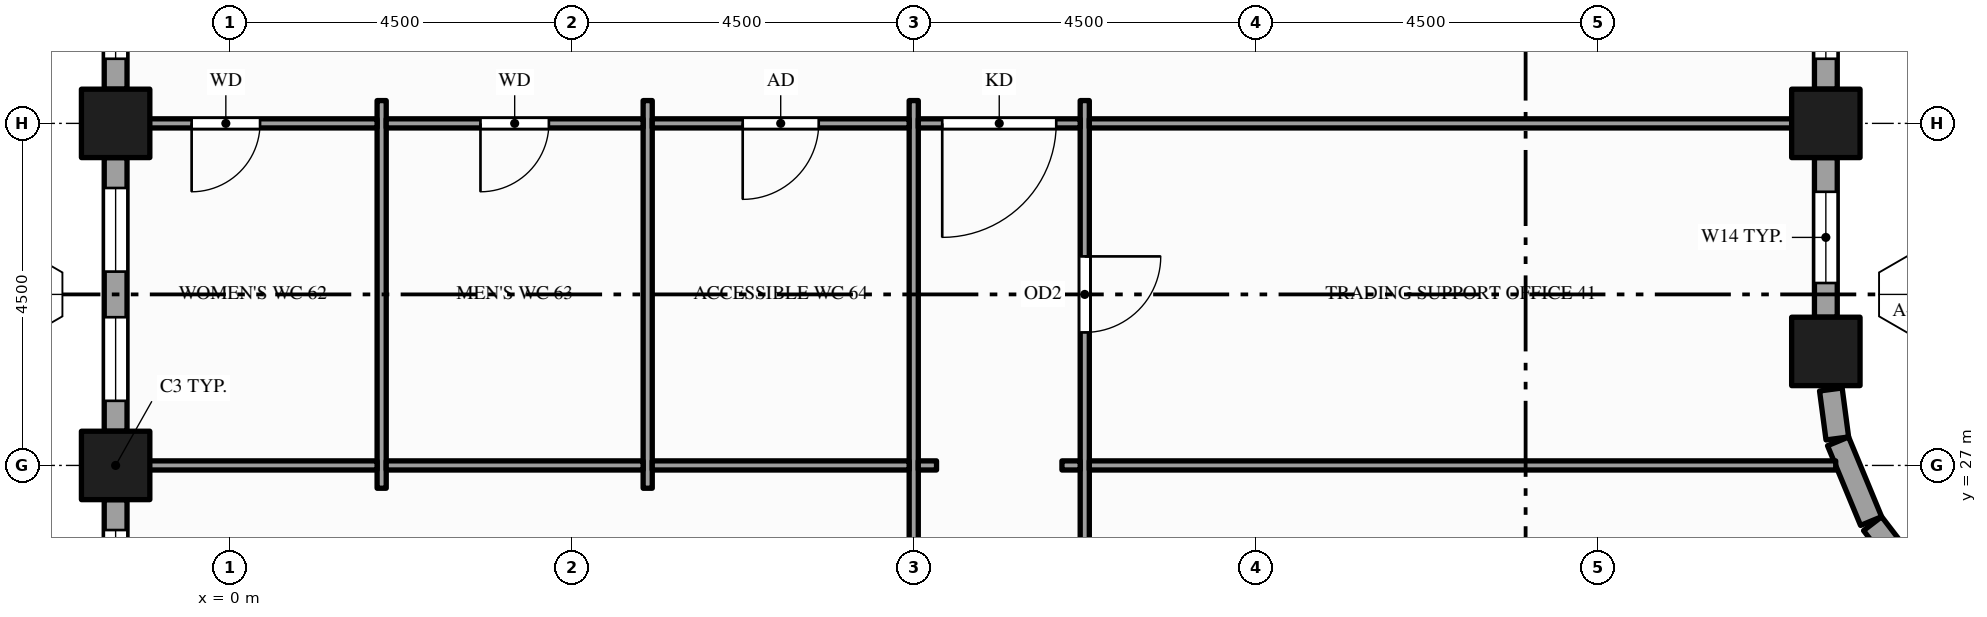
"""IFC4 building model, lengths in metres.
Left out: names, types, materials, properties, quantities, classifications, styles, units other than length and angle.
Written with IfcOpenShell. Run it as: python <this file> out.ifc"""

import sys

from ifc_helpers import new_model, si_unit, direction, frame, frame_2d, origin, origin_2d, place, context, subcontext, project, spatial, rectangle, hollow_rectangle, extrude, element, fill, save


model = new_model("IFC4")
c1 = context("Model", 3, precision=1e-05, world=origin(), true_north=direction((0.0, 1.0)))
c2 = subcontext(c1, "Body", "Model", "MODEL_VIEW")
j1 = project(units=[si_unit("LENGTHUNIT", "METRE"), si_unit("PLANEANGLEUNIT", "RADIAN")], contexts=[c1])
p1 = place(None, origin())
s1 = spatial("IfcSite", under=j1, at=p1, CompositionType="ELEMENT")
p2 = place(p1, origin())
s2 = spatial("IfcBuilding", under=s1, at=p2, CompositionType="ELEMENT")
p3 = place(p2, frame((0.0, 0.0, 139.0)))
s3 = spatial("IfcBuildingStorey", under=s2, at=p3, CompositionType="ELEMENT", Elevation=139.0)
for number, where, z_axis, x_axis in (
    (1, (-1.5, 27.0, -0.15), (0.0, 0.0, 1.0), (1.0, 0.0, 0.0)),
    (2, (-1.5, 31.5, -0.15), (0.0, 0.0, 1.0), (1.0, 0.0, 0.0)),
    (3, (21.0, 28.5, -0.15), (0.0, 0.0, 1.0), (1.0, 0.0, 0.0)),
    (4, (21.0, 31.5, -0.15), (0.0, 0.0, 1.0), (1.0, 0.0, 0.0)),
):
    element("IfcColumn", number, at=place(p3, frame(where, z_axis=z_axis, x_axis=x_axis)), inside=s3, PredefinedType="COLUMN", context=c2, shape_type="SweptSolid", body=[
        extrude(hollow_rectangle(XDim=0.9, YDim=0.9, WallThickness=0.045, at=origin_2d()), origin(), (0.0, 0.0, 1.0), 4.0),
    ])
p4 = place(p3, frame((21.934, 25.819, 0.0), z_axis=(0.0, 0.0, 1.0), x_axis=(-0.608539141726, 0.793523857856, 0.0)))
e5 = element("IfcWall", 5, at=p4, inside=s3, PredefinedType="STANDARD", context=c2, shape_type="SweptSolid", body=[
    extrude(rectangle(XDim=0.524, YDim=0.3, at=frame_2d((0.262, 0.0))), origin(), (0.0, 0.0, 1.0), 3.149),
])
p5 = place(p3, frame((21.595, 26.268, 0.0), z_axis=(0.0, 0.0, 1.0), x_axis=(-0.382598720491, 0.923914616768, 0.0)))
e6 = element("IfcWall", 6, at=p5, inside=s3, PredefinedType="STANDARD", context=c2, shape_type="SweptSolid", body=[
    extrude(rectangle(XDim=1.135, YDim=0.3, at=frame_2d((0.568, 0.0))), origin(), (0.0, 0.0, 1.0), 3.149),
])
p6 = place(p3, frame((21.151, 27.355, 0.0), z_axis=(0.0, 0.0, 1.0), x_axis=(-0.130687655177, 0.991423590996, 0.0)))
e7 = element("IfcWall", 7, at=p6, inside=s3, PredefinedType="STANDARD", context=c2, shape_type="SweptSolid", body=[
    extrude(rectangle(XDim=0.65, YDim=0.3, at=frame_2d((0.325, 0.0))), origin(), (0.0, 0.0, 1.0), 3.149),
])
p7 = place(p3, frame((21.0, 28.95, 0.0), z_axis=(0.0, 0.0, 1.0), x_axis=(0.0, 1.0, 0.0)))
e8 = element("IfcWall", 8, at=p7, inside=s3, PredefinedType="STANDARD", context=c2, shape_type="SweptSolid", body=[
    extrude(rectangle(XDim=2.1, YDim=0.3, at=frame_2d((1.05, 0.0))), origin(), (0.0, 0.0, 1.0), 3.149),
])
p8 = place(p7, frame((0.45, 0.0, 0.9)))
e9 = element("IfcOpeningElement", 9, at=p8, cuts=e8, PredefinedType="OPENING", context=c2, shape_type="SweptSolid", body=[
    extrude(rectangle(XDim=1.2, YDim=2.0, at=frame_2d((0.6, 1.0))), frame((0.0, 0.16, 0.0), z_axis=(0.0, -1.0, 0.0), x_axis=(1.0, 0.0, 0.0)), (0.0, 0.0, 1.0), 0.32),
])
p9 = place(p3, frame((21.0, 31.95, 0.0), z_axis=(0.0, 0.0, 1.0), x_axis=(0.0, 1.0, 0.0)))
e10 = element("IfcWall", 10, at=p9, inside=s3, PredefinedType="STANDARD", context=c2, shape_type="SweptSolid", body=[
    extrude(rectangle(XDim=4.05, YDim=0.3, at=frame_2d((2.025, 0.0))), origin(), (0.0, 0.0, 1.0), 3.149),
])
p10 = place(p9, frame((0.4, 0.0, 0.9)))
e11 = element("IfcOpeningElement", 11, at=p10, cuts=e10, PredefinedType="OPENING", context=c2, shape_type="SweptSolid", body=[
    extrude(rectangle(XDim=1.1, YDim=2.0, at=frame_2d((0.55, 1.0))), frame((0.0, 0.16, 0.0), z_axis=(0.0, -1.0, 0.0), x_axis=(1.0, 0.0, 0.0)), (0.0, 0.0, 1.0), 0.32),
])
p11 = place(p9, frame((2.1, 0.0, 0.9)))
e12 = element("IfcOpeningElement", 12, at=p11, cuts=e10, PredefinedType="OPENING", context=c2, shape_type="SweptSolid", body=[
    extrude(rectangle(XDim=1.55, YDim=2.0, at=frame_2d((0.775, 1.0))), frame((0.0, 0.16, 0.0), z_axis=(0.0, -1.0, 0.0), x_axis=(1.0, 0.0, 0.0)), (0.0, 0.0, 1.0), 0.32),
])
p12 = place(p3, frame((-1.5, 35.55, 0.0), z_axis=(0.0, 0.0, 1.0), x_axis=(0.0, -1.0, 0.0)))
e13 = element("IfcWall", 13, at=p12, inside=s3, PredefinedType="STANDARD", context=c2, shape_type="SweptSolid", body=[
    extrude(rectangle(XDim=3.6, YDim=0.3, at=frame_2d((1.8, 0.0))), origin(), (0.0, 0.0, 1.0), 3.149),
])
p13 = place(p12, frame((0.4, 0.0, 0.9)))
e14 = element("IfcOpeningElement", 14, at=p13, cuts=e13, PredefinedType="OPENING", context=c2, shape_type="SweptSolid", body=[
    extrude(rectangle(XDim=1.1, YDim=2.0, at=frame_2d((0.55, 1.0))), frame((0.0, 0.16, 0.0), z_axis=(0.0, -1.0, 0.0), x_axis=(1.0, 0.0, 0.0)), (0.0, 0.0, 1.0), 0.32),
])
p14 = place(p12, frame((2.1, 0.0, 0.9)))
e15 = element("IfcOpeningElement", 15, at=p14, cuts=e13, PredefinedType="OPENING", context=c2, shape_type="SweptSolid", body=[
    extrude(rectangle(XDim=1.1, YDim=2.0, at=frame_2d((0.55, 1.0))), frame((0.0, 0.16, 0.0), z_axis=(0.0, -1.0, 0.0), x_axis=(1.0, 0.0, 0.0)), (0.0, 0.0, 1.0), 0.32),
])
p15 = place(p3, frame((-1.5, 31.05, 0.0), z_axis=(0.0, 0.0, 1.0), x_axis=(0.0, -1.0, 0.0)))
e16 = element("IfcWall", 16, at=p15, inside=s3, PredefinedType="STANDARD", context=c2, shape_type="SweptSolid", body=[
    extrude(rectangle(XDim=3.6, YDim=0.3, at=frame_2d((1.8, 0.0))), origin(), (0.0, 0.0, 1.0), 3.149),
])
p16 = place(p15, frame((0.4, 0.0, 0.9)))
e17 = element("IfcOpeningElement", 17, at=p16, cuts=e16, PredefinedType="OPENING", context=c2, shape_type="SweptSolid", body=[
    extrude(rectangle(XDim=1.1, YDim=2.0, at=frame_2d((0.55, 1.0))), frame((0.0, 0.16, 0.0), z_axis=(0.0, -1.0, 0.0), x_axis=(1.0, 0.0, 0.0)), (0.0, 0.0, 1.0), 0.32),
])
p17 = place(p15, frame((2.1, 0.0, 0.9)))
e18 = element("IfcOpeningElement", 18, at=p17, cuts=e16, PredefinedType="OPENING", context=c2, shape_type="SweptSolid", body=[
    extrude(rectangle(XDim=1.1, YDim=2.0, at=frame_2d((0.55, 1.0))), frame((0.0, 0.16, 0.0), z_axis=(0.0, -1.0, 0.0), x_axis=(1.0, 0.0, 0.0)), (0.0, 0.0, 1.0), 0.32),
])
p18 = place(p3, frame((-1.5, 26.55, 0.0), z_axis=(0.0, 0.0, 1.0), x_axis=(0.0, -1.0, 0.0)))
e19 = element("IfcWall", 19, at=p18, inside=s3, PredefinedType="STANDARD", context=c2, shape_type="SweptSolid", body=[
    extrude(rectangle(XDim=3.6, YDim=0.3, at=frame_2d((1.8, 0.0))), origin(), (0.0, 0.0, 1.0), 3.149),
])
p19 = place(p18, frame((0.4, 0.0, 0.9)))
e20 = element("IfcOpeningElement", 20, at=p19, cuts=e19, PredefinedType="OPENING", context=c2, shape_type="SweptSolid", body=[
    extrude(rectangle(XDim=1.1, YDim=2.0, at=frame_2d((0.55, 1.0))), frame((0.0, 0.16, 0.0), z_axis=(0.0, -1.0, 0.0), x_axis=(1.0, 0.0, 0.0)), (0.0, 0.0, 1.0), 0.32),
])
p20 = place(p18, frame((2.1, 0.0, 0.9)))
e21 = element("IfcOpeningElement", 21, at=p20, cuts=e19, PredefinedType="OPENING", context=c2, shape_type="SweptSolid", body=[
    extrude(rectangle(XDim=1.1, YDim=2.0, at=frame_2d((0.55, 1.0))), frame((0.0, 0.16, 0.0), z_axis=(0.0, -1.0, 0.0), x_axis=(1.0, 0.0, 0.0)), (0.0, 0.0, 1.0), 0.32),
])
for number, where, z_axis, x_axis in (
    (22, (2.0, 26.7, 0.0), (0.0, 0.0, 1.0), (0.0, 1.0, 0.0)),
    (23, (5.5, 26.7, 0.0), (0.0, 0.0, 1.0), (0.0, 1.0, 0.0)),
):
    element("IfcWall", number, at=place(p3, frame(where, z_axis=z_axis, x_axis=x_axis)), inside=s3, PredefinedType="PARTITIONING", context=c2, shape_type="SweptSolid", body=[
        extrude(rectangle(XDim=5.1, YDim=0.12, at=frame_2d((2.55, 0.0))), origin(), (0.0, 0.0, 1.0), 3.85),
    ])
p21 = place(p3, frame((9.0, 10.95, 0.0), z_axis=(0.0, 0.0, 1.0), x_axis=(0.0, 1.0, 0.0)))
e24 = element("IfcWall", 24, at=p21, inside=s3, PredefinedType="PARTITIONING", context=c2, shape_type="SweptSolid", body=[
    extrude(rectangle(XDim=20.85, YDim=0.12, at=frame_2d((10.425, 0.0))), origin(), (0.0, 0.0, 1.0), 2.6),
])
p22 = place(p21, frame((2.05, 0.0, 0.0)))
e25 = element("IfcOpeningElement", 25, at=p22, cuts=e24, PredefinedType="OPENING", context=c2, shape_type="SweptSolid", body=[
    extrude(rectangle(XDim=1.0, YDim=2.1, at=frame_2d((0.5, 1.05))), frame((0.0, 0.07, 0.0), z_axis=(0.0, -1.0, 0.0), x_axis=(1.0, 0.0, 0.0)), (0.0, 0.0, 1.0), 0.14),
])
p23 = place(p21, frame((6.55, 0.0, 0.0)))
e26 = element("IfcOpeningElement", 26, at=p23, cuts=e24, PredefinedType="OPENING", context=c2, shape_type="SweptSolid", body=[
    extrude(rectangle(XDim=1.0, YDim=2.1, at=frame_2d((0.5, 1.05))), frame((0.0, 0.07, 0.0), z_axis=(0.0, -1.0, 0.0), x_axis=(1.0, 0.0, 0.0)), (0.0, 0.0, 1.0), 0.14),
])
p24 = place(p21, frame((11.805, 0.0, 0.0)))
e27 = element("IfcOpeningElement", 27, at=p24, cuts=e24, PredefinedType="OPENING", context=c2, shape_type="SweptSolid", body=[
    extrude(rectangle(XDim=1.8, YDim=2.1, at=frame_2d((0.9, 1.05))), frame((0.0, 0.07, 0.0), z_axis=(0.0, -1.0, 0.0), x_axis=(1.0, 0.0, 0.0)), (0.0, 0.0, 1.0), 0.14),
])
p25 = place(p3, frame((11.25, 10.95, 0.0), z_axis=(0.0, 0.0, 1.0), x_axis=(0.0, 1.0, 0.0)))
e28 = element("IfcWall", 28, at=p25, inside=s3, PredefinedType="PARTITIONING", context=c2, shape_type="SweptSolid", body=[
    extrude(rectangle(XDim=20.85, YDim=0.12, at=frame_2d((10.425, 0.0))), origin(), (0.0, 0.0, 1.0), 2.6),
])
p26 = place(p25, frame((17.8, 0.0, 0.0)))
e29 = element("IfcOpeningElement", 29, at=p26, cuts=e28, PredefinedType="OPENING", context=c2, shape_type="SweptSolid", body=[
    extrude(rectangle(XDim=1.0, YDim=2.1, at=frame_2d((0.5, 1.05))), frame((0.0, 0.07, 0.0), z_axis=(0.0, -1.0, 0.0), x_axis=(1.0, 0.0, 0.0)), (0.0, 0.0, 1.0), 0.14),
])
p27 = place(p25, frame((4.2, 0.0, 0.0)))
e30 = element("IfcOpeningElement", 30, at=p27, cuts=e28, PredefinedType="OPENING", context=c2, shape_type="SweptSolid", body=[
    extrude(rectangle(XDim=1.2, YDim=2.1, at=frame_2d((0.6, 1.05))), frame((0.0, 0.07, 0.0), z_axis=(0.0, -1.0, 0.0), x_axis=(1.0, 0.0, 0.0)), (0.0, 0.0, 1.0), 0.14),
])
p28 = place(p3, frame((-1.35, 27.0, 0.0), z_axis=(0.0, 0.0, 1.0), x_axis=(1.0, 0.0, 0.0)))
e31 = element("IfcWall", 31, at=p28, inside=s3, PredefinedType="PARTITIONING", context=c2, shape_type="SweptSolid", body=[
    extrude(rectangle(XDim=3.29, YDim=0.12, at=frame_2d((1.645, 0.0))), origin(), (0.0, 0.0, 1.0), 2.87),
])
for number, where, z_axis, x_axis in (
    (32, (2.06, 27.0, 0.0), (0.0, 0.0, 1.0), (1.0, 0.0, 0.0)),
    (33, (5.56, 27.0, 0.0), (0.0, 0.0, 1.0), (1.0, 0.0, 0.0)),
):
    element("IfcWall", number, at=place(p3, frame(where, z_axis=z_axis, x_axis=x_axis)), inside=s3, PredefinedType="PARTITIONING", context=c2, shape_type="SweptSolid", body=[
        extrude(rectangle(XDim=3.38, YDim=0.12, at=frame_2d((1.69, 0.0))), origin(), (0.0, 0.0, 1.0), 2.87),
    ])
for number, where, z_axis, x_axis in (
    (34, (9.06, 27.0, 0.0), (0.0, 0.0, 1.0), (1.0, 0.0, 0.0)),
    (35, (10.95, 27.0, 0.0), (0.0, 0.0, 1.0), (1.0, 0.0, 0.0)),
):
    element("IfcWall", number, at=place(p3, frame(where, z_axis=z_axis, x_axis=x_axis)), inside=s3, PredefinedType="PARTITIONING", context=c2, shape_type="SweptSolid", body=[
        extrude(rectangle(XDim=0.24, YDim=0.12, at=frame_2d((0.12, 0.0))), origin(), (0.0, 0.0, 1.0), 2.87),
    ])
p29 = place(p3, frame((11.31, 27.0, 0.0), z_axis=(0.0, 0.0, 1.0), x_axis=(1.0, 0.0, 0.0)))
e36 = element("IfcWall", 36, at=p29, inside=s3, PredefinedType="PARTITIONING", context=c2, shape_type="SweptSolid", body=[
    extrude(rectangle(XDim=9.82, YDim=0.12, at=frame_2d((4.91, 0.0))), origin(), (0.0, 0.0, 1.0), 2.87),
])
p30 = place(p3, frame((-1.35, 31.5, 0.0), z_axis=(0.0, 0.0, 1.0), x_axis=(1.0, 0.0, 0.0)))
e37 = element("IfcWall", 37, at=p30, inside=s3, PredefinedType="PARTITIONING", context=c2, shape_type="SweptSolid", body=[
    extrude(rectangle(XDim=3.29, YDim=0.12, at=frame_2d((1.645, 0.0))), origin(), (0.0, 0.0, 1.0), 2.87),
])
p31 = place(p30, frame((0.85, 0.0, 0.0)))
e38 = element("IfcOpeningElement", 38, at=p31, cuts=e37, PredefinedType="OPENING", context=c2, shape_type="SweptSolid", body=[
    extrude(rectangle(XDim=0.9, YDim=2.1, at=frame_2d((0.45, 1.05))), frame((0.0, 0.07, 0.0), z_axis=(0.0, -1.0, 0.0), x_axis=(1.0, 0.0, 0.0)), (0.0, 0.0, 1.0), 0.14),
])
p32 = place(p3, frame((2.06, 31.5, 0.0), z_axis=(0.0, 0.0, 1.0), x_axis=(1.0, 0.0, 0.0)))
e39 = element("IfcWall", 39, at=p32, inside=s3, PredefinedType="PARTITIONING", context=c2, shape_type="SweptSolid", body=[
    extrude(rectangle(XDim=3.38, YDim=0.12, at=frame_2d((1.69, 0.0))), origin(), (0.0, 0.0, 1.0), 2.87),
])
p33 = place(p32, frame((1.24, 0.0, 0.0)))
e40 = element("IfcOpeningElement", 40, at=p33, cuts=e39, PredefinedType="OPENING", context=c2, shape_type="SweptSolid", body=[
    extrude(rectangle(XDim=0.9, YDim=2.1, at=frame_2d((0.45, 1.05))), frame((0.0, 0.07, 0.0), z_axis=(0.0, -1.0, 0.0), x_axis=(1.0, 0.0, 0.0)), (0.0, 0.0, 1.0), 0.14),
])
p34 = place(p3, frame((5.56, 31.5, 0.0), z_axis=(0.0, 0.0, 1.0), x_axis=(1.0, 0.0, 0.0)))
e41 = element("IfcWall", 41, at=p34, inside=s3, PredefinedType="PARTITIONING", context=c2, shape_type="SweptSolid", body=[
    extrude(rectangle(XDim=3.38, YDim=0.12, at=frame_2d((1.69, 0.0))), origin(), (0.0, 0.0, 1.0), 2.87),
])
p35 = place(p34, frame((1.19, 0.0, 0.0)))
e42 = element("IfcOpeningElement", 42, at=p35, cuts=e41, PredefinedType="OPENING", context=c2, shape_type="SweptSolid", body=[
    extrude(rectangle(XDim=1.0, YDim=2.1, at=frame_2d((0.5, 1.05))), frame((0.0, 0.07, 0.0), z_axis=(0.0, -1.0, 0.0), x_axis=(1.0, 0.0, 0.0)), (0.0, 0.0, 1.0), 0.14),
])
p36 = place(p3, frame((9.06, 31.5, 0.0), z_axis=(0.0, 0.0, 1.0), x_axis=(1.0, 0.0, 0.0)))
e43 = element("IfcWall", 43, at=p36, inside=s3, PredefinedType="PARTITIONING", context=c2, shape_type="SweptSolid", body=[
    extrude(rectangle(XDim=2.13, YDim=0.12, at=frame_2d((1.065, 0.0))), origin(), (0.0, 0.0, 1.0), 2.87),
])
p37 = place(p36, frame((0.315, 0.0, 0.0)))
e44 = element("IfcOpeningElement", 44, at=p37, cuts=e43, PredefinedType="OPENING", context=c2, shape_type="SweptSolid", body=[
    extrude(rectangle(XDim=1.5, YDim=2.1, at=frame_2d((0.75, 1.05))), frame((0.0, 0.07, 0.0), z_axis=(0.0, -1.0, 0.0), x_axis=(1.0, 0.0, 0.0)), (0.0, 0.0, 1.0), 0.14),
])
p38 = place(p3, frame((11.31, 31.5, 0.0), z_axis=(0.0, 0.0, 1.0), x_axis=(1.0, 0.0, 0.0)))
e45 = element("IfcWall", 45, at=p38, inside=s3, PredefinedType="PARTITIONING", context=c2, shape_type="SweptSolid", body=[
    extrude(rectangle(XDim=9.54, YDim=0.12, at=frame_2d((4.77, 0.0))), origin(), (0.0, 0.0, 1.0), 2.87),
])
p39 = place(p8, origin())
e46 = element("IfcWindow", 46, at=p39, inside=s3, PartitioningType="SINGLE_PANEL", PredefinedType="WINDOW", context=c2, shape_type="SweptSolid", body=[
    extrude(rectangle(XDim=1.2, YDim=2.0, at=frame_2d((0.6, 1.0))), frame((0.0, 0.03, 0.0), z_axis=(0.0, -1.0, 0.0), x_axis=(1.0, 0.0, 0.0)), (0.0, 0.0, 1.0), 0.06),
])
fill(e9, e46)
p40 = place(p10, origin())
e47 = element("IfcWindow", 47, at=p40, inside=s3, PartitioningType="SINGLE_PANEL", PredefinedType="WINDOW", context=c2, shape_type="SweptSolid", body=[
    extrude(rectangle(XDim=1.1, YDim=2.0, at=frame_2d((0.55, 1.0))), frame((0.0, 0.03, 0.0), z_axis=(0.0, -1.0, 0.0), x_axis=(1.0, 0.0, 0.0)), (0.0, 0.0, 1.0), 0.06),
])
fill(e11, e47)
p41 = place(p14, origin())
e48 = element("IfcWindow", 48, at=p41, inside=s3, PartitioningType="SINGLE_PANEL", PredefinedType="WINDOW", context=c2, shape_type="SweptSolid", body=[
    extrude(rectangle(XDim=1.1, YDim=2.0, at=frame_2d((0.55, 1.0))), frame((0.0, 0.03, 0.0), z_axis=(0.0, -1.0, 0.0), x_axis=(1.0, 0.0, 0.0)), (0.0, 0.0, 1.0), 0.06),
])
fill(e15, e48)
p42 = place(p16, origin())
e49 = element("IfcWindow", 49, at=p42, inside=s3, PartitioningType="SINGLE_PANEL", PredefinedType="WINDOW", context=c2, shape_type="SweptSolid", body=[
    extrude(rectangle(XDim=1.1, YDim=2.0, at=frame_2d((0.55, 1.0))), frame((0.0, 0.03, 0.0), z_axis=(0.0, -1.0, 0.0), x_axis=(1.0, 0.0, 0.0)), (0.0, 0.0, 1.0), 0.06),
])
fill(e17, e49)
p43 = place(p17, origin())
e50 = element("IfcWindow", 50, at=p43, inside=s3, PartitioningType="SINGLE_PANEL", PredefinedType="WINDOW", context=c2, shape_type="SweptSolid", body=[
    extrude(rectangle(XDim=1.1, YDim=2.0, at=frame_2d((0.55, 1.0))), frame((0.0, 0.03, 0.0), z_axis=(0.0, -1.0, 0.0), x_axis=(1.0, 0.0, 0.0)), (0.0, 0.0, 1.0), 0.06),
])
fill(e18, e50)
p44 = place(p19, origin())
e51 = element("IfcWindow", 51, at=p44, inside=s3, PartitioningType="SINGLE_PANEL", PredefinedType="WINDOW", context=c2, shape_type="SweptSolid", body=[
    extrude(rectangle(XDim=1.1, YDim=2.0, at=frame_2d((0.55, 1.0))), frame((0.0, 0.03, 0.0), z_axis=(0.0, -1.0, 0.0), x_axis=(1.0, 0.0, 0.0)), (0.0, 0.0, 1.0), 0.06),
])
fill(e20, e51)
p45 = place(p37, origin())
e52 = element("IfcDoor", 52, at=p45, inside=s3, OperationType="SINGLE_SWING_LEFT", PredefinedType="DOOR", context=c2, shape_type="SweptSolid", body=[
    extrude(rectangle(XDim=1.5, YDim=2.1, at=frame_2d((0.75, 1.05))), frame((0.0, 0.025, 0.0), z_axis=(0.0, -1.0, 0.0), x_axis=(1.0, 0.0, 0.0)), (0.0, 0.0, 1.0), 0.05),
])
fill(e44, e52)
p46 = place(p31, origin())
e53 = element("IfcDoor", 53, at=p46, inside=s3, OperationType="SINGLE_SWING_LEFT", PredefinedType="DOOR", context=c2, shape_type="SweptSolid", body=[
    extrude(rectangle(XDim=0.9, YDim=2.1, at=frame_2d((0.45, 1.05))), frame((0.0, 0.025, 0.0), z_axis=(0.0, -1.0, 0.0), x_axis=(1.0, 0.0, 0.0)), (0.0, 0.0, 1.0), 0.05),
])
fill(e38, e53)
p47 = place(p33, origin())
e54 = element("IfcDoor", 54, at=p47, inside=s3, OperationType="SINGLE_SWING_LEFT", PredefinedType="DOOR", context=c2, shape_type="SweptSolid", body=[
    extrude(rectangle(XDim=0.9, YDim=2.1, at=frame_2d((0.45, 1.05))), frame((0.0, 0.025, 0.0), z_axis=(0.0, -1.0, 0.0), x_axis=(1.0, 0.0, 0.0)), (0.0, 0.0, 1.0), 0.05),
])
fill(e40, e54)
p48 = place(p35, origin())
e55 = element("IfcDoor", 55, at=p48, inside=s3, OperationType="SINGLE_SWING_LEFT", PredefinedType="DOOR", context=c2, shape_type="SweptSolid", body=[
    extrude(rectangle(XDim=1.0, YDim=2.1, at=frame_2d((0.5, 1.05))), frame((0.0, 0.025, 0.0), z_axis=(0.0, -1.0, 0.0), x_axis=(1.0, 0.0, 0.0)), (0.0, 0.0, 1.0), 0.05),
])
fill(e42, e55)
p49 = place(p26, origin())
e56 = element("IfcDoor", 56, at=p49, inside=s3, OperationType="SINGLE_SWING_RIGHT", PredefinedType="DOOR", context=c2, shape_type="SweptSolid", body=[
    extrude(rectangle(XDim=1.0, YDim=2.1, at=frame_2d((0.5, 1.05))), frame((0.0, 0.025, 0.0), z_axis=(0.0, -1.0, 0.0), x_axis=(1.0, 0.0, 0.0)), (0.0, 0.0, 1.0), 0.05),
])
fill(e29, e56)
save(model, sys.argv[1])
